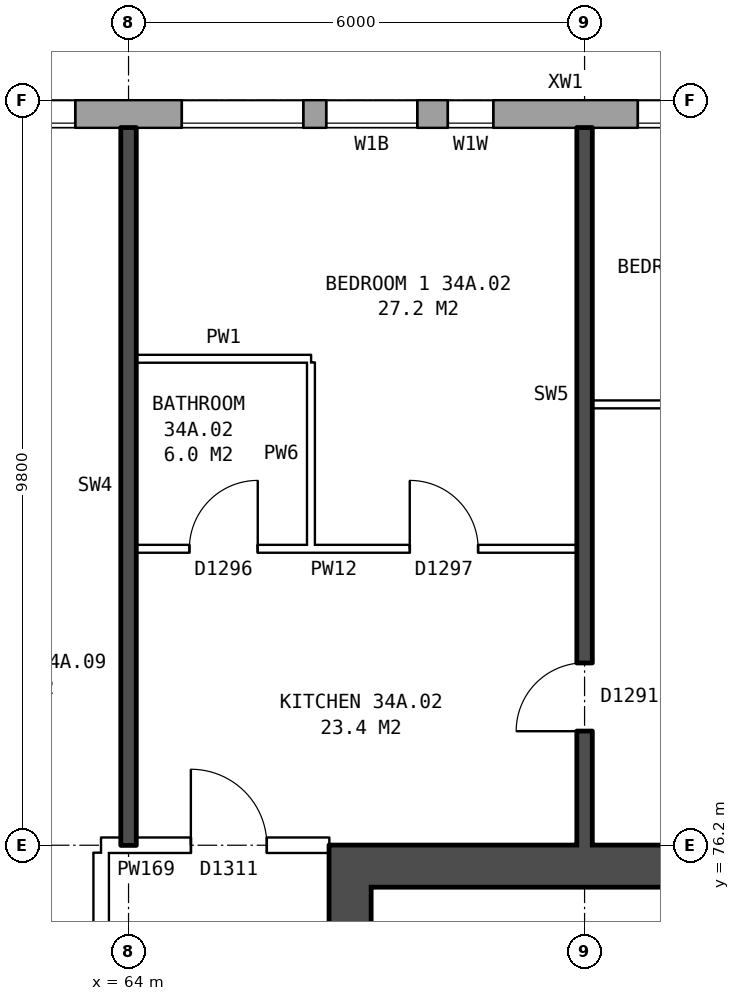
"""IFC4 building model, lengths in metres.
Left out: names, types, materials, properties, quantities, classifications, styles, units other than length and angle.
Written with IfcOpenShell. Run it as: python <this file> out.ifc"""

import sys

from ifc_helpers import new_model, si_unit, direction, frame, frame_2d, origin, place, context, subcontext, project, spatial, rectangle, extrude, element, fill, save


model = new_model("IFC4")
c1 = context("Model", 3, precision=1e-05, world=origin(), true_north=direction((0.0, 1.0)))
c2 = subcontext(c1, "Body", "Model", "MODEL_VIEW")
j1 = project(units=[si_unit("LENGTHUNIT", "METRE"), si_unit("PLANEANGLEUNIT", "RADIAN")], contexts=[c1])
p1 = place(None, origin())
s1 = spatial("IfcSite", under=j1, at=p1, CompositionType="ELEMENT")
p2 = place(p1, origin())
s2 = spatial("IfcBuilding", under=s1, at=p2, CompositionType="ELEMENT")
p3 = place(p2, frame((0.0, 0.0, 123.7)))
s3 = spatial("IfcBuildingStorey", under=s2, at=p3, CompositionType="ELEMENT", Elevation=123.7)
p4 = place(p3, frame((72.925, 85.82, 0.0), z_axis=(0.0, 0.0, 1.0), x_axis=(-1.0, 0.0, 0.0)))
e1 = element("IfcWall", 1, at=p4, inside=s3, PredefinedType="STANDARD", context=c2, shape_type="SweptSolid", body=[
    extrude(rectangle(XDim=43.101, YDim=0.36, at=frame_2d((21.55, 0.0))), origin(), (0.0, 0.0, 1.0), 2.85),
])
p5 = place(p4, frame((0.625, 0.0, 0.8)))
e2 = element("IfcOpeningElement", 2, at=p5, cuts=e1, PredefinedType="OPENING", context=c2, shape_type="SweptSolid", body=[
    extrude(rectangle(XDim=1.6, YDim=1.8, at=frame_2d((0.8, 0.9))), frame((0.0, 0.19, 0.0), z_axis=(0.0, -1.0, 0.0), x_axis=(1.0, 0.0, 0.0)), (0.0, 0.0, 1.0), 0.38),
])
p6 = place(p4, frame((4.125, 0.0, 0.8)))
e3 = element("IfcOpeningElement", 3, at=p6, cuts=e1, PredefinedType="OPENING", context=c2, shape_type="SweptSolid", body=[
    extrude(rectangle(XDim=0.6, YDim=0.9, at=frame_2d((0.3, 0.45))), frame((0.0, 0.19, 0.0), z_axis=(0.0, -1.0, 0.0), x_axis=(1.0, 0.0, 0.0)), (0.0, 0.0, 1.0), 0.38),
])
p7 = place(p4, frame((6.625, 0.0, 0.8)))
e4 = element("IfcOpeningElement", 4, at=p7, cuts=e1, PredefinedType="OPENING", context=c2, shape_type="SweptSolid", body=[
    extrude(rectangle(XDim=1.6, YDim=1.8, at=frame_2d((0.8, 0.9))), frame((0.0, 0.19, 0.0), z_axis=(0.0, -1.0, 0.0), x_axis=(1.0, 0.0, 0.0)), (0.0, 0.0, 1.0), 0.38),
])
p8 = place(p4, frame((9.625, 0.0, 0.8)))
e5 = element("IfcOpeningElement", 5, at=p8, cuts=e1, PredefinedType="OPENING", context=c2, shape_type="SweptSolid", body=[
    extrude(rectangle(XDim=1.6, YDim=1.8, at=frame_2d((0.8, 0.9))), frame((0.0, 0.19, 0.0), z_axis=(0.0, -1.0, 0.0), x_axis=(1.0, 0.0, 0.0)), (0.0, 0.0, 1.0), 0.38),
])
p9 = place(p4, frame((12.625, 0.0, 0.8)))
e6 = element("IfcOpeningElement", 6, at=p9, cuts=e1, PredefinedType="OPENING", context=c2, shape_type="SweptSolid", body=[
    extrude(rectangle(XDim=1.6, YDim=1.8, at=frame_2d((0.8, 0.9))), frame((0.0, 0.19, 0.0), z_axis=(0.0, -1.0, 0.0), x_axis=(1.0, 0.0, 0.0)), (0.0, 0.0, 1.0), 0.38),
])
p10 = place(p4, frame((15.625, 0.0, 0.8)))
e7 = element("IfcOpeningElement", 7, at=p10, cuts=e1, PredefinedType="OPENING", context=c2, shape_type="SweptSolid", body=[
    extrude(rectangle(XDim=1.6, YDim=1.8, at=frame_2d((0.8, 0.9))), frame((0.0, 0.19, 0.0), z_axis=(0.0, -1.0, 0.0), x_axis=(1.0, 0.0, 0.0)), (0.0, 0.0, 1.0), 0.38),
])
p11 = place(p4, frame((18.625, 0.0, 0.8)))
e8 = element("IfcOpeningElement", 8, at=p11, cuts=e1, PredefinedType="OPENING", context=c2, shape_type="SweptSolid", body=[
    extrude(rectangle(XDim=1.6, YDim=1.8, at=frame_2d((0.8, 0.9))), frame((0.0, 0.19, 0.0), z_axis=(0.0, -1.0, 0.0), x_axis=(1.0, 0.0, 0.0)), (0.0, 0.0, 1.0), 0.38),
])
p12 = place(p4, frame((21.625, 0.0, 0.8)))
e9 = element("IfcOpeningElement", 9, at=p12, cuts=e1, PredefinedType="OPENING", context=c2, shape_type="SweptSolid", body=[
    extrude(rectangle(XDim=1.6, YDim=1.8, at=frame_2d((0.8, 0.9))), frame((0.0, 0.19, 0.0), z_axis=(0.0, -1.0, 0.0), x_axis=(1.0, 0.0, 0.0)), (0.0, 0.0, 1.0), 0.38),
])
p13 = place(p4, frame((24.625, 0.0, 0.8)))
e10 = element("IfcOpeningElement", 10, at=p13, cuts=e1, PredefinedType="OPENING", context=c2, shape_type="SweptSolid", body=[
    extrude(rectangle(XDim=1.6, YDim=1.8, at=frame_2d((0.8, 0.9))), frame((0.0, 0.19, 0.0), z_axis=(0.0, -1.0, 0.0), x_axis=(1.0, 0.0, 0.0)), (0.0, 0.0, 1.0), 0.38),
])
p14 = place(p4, frame((27.625, 0.0, 0.8)))
e11 = element("IfcOpeningElement", 11, at=p14, cuts=e1, PredefinedType="OPENING", context=c2, shape_type="SweptSolid", body=[
    extrude(rectangle(XDim=1.6, YDim=1.8, at=frame_2d((0.8, 0.9))), frame((0.0, 0.19, 0.0), z_axis=(0.0, -1.0, 0.0), x_axis=(1.0, 0.0, 0.0)), (0.0, 0.0, 1.0), 0.38),
])
p15 = place(p4, frame((30.625, 0.0, 0.8)))
e12 = element("IfcOpeningElement", 12, at=p15, cuts=e1, PredefinedType="OPENING", context=c2, shape_type="SweptSolid", body=[
    extrude(rectangle(XDim=1.6, YDim=1.8, at=frame_2d((0.8, 0.9))), frame((0.0, 0.19, 0.0), z_axis=(0.0, -1.0, 0.0), x_axis=(1.0, 0.0, 0.0)), (0.0, 0.0, 1.0), 0.38),
])
p16 = place(p4, frame((33.625, 0.0, 0.8)))
e13 = element("IfcOpeningElement", 13, at=p16, cuts=e1, PredefinedType="OPENING", context=c2, shape_type="SweptSolid", body=[
    extrude(rectangle(XDim=1.6, YDim=1.8, at=frame_2d((0.8, 0.9))), frame((0.0, 0.19, 0.0), z_axis=(0.0, -1.0, 0.0), x_axis=(1.0, 0.0, 0.0)), (0.0, 0.0, 1.0), 0.38),
])
p17 = place(p4, frame((36.625, 0.0, 0.8)))
e14 = element("IfcOpeningElement", 14, at=p17, cuts=e1, PredefinedType="OPENING", context=c2, shape_type="SweptSolid", body=[
    extrude(rectangle(XDim=1.6, YDim=1.8, at=frame_2d((0.8, 0.9))), frame((0.0, 0.19, 0.0), z_axis=(0.0, -1.0, 0.0), x_axis=(1.0, 0.0, 0.0)), (0.0, 0.0, 1.0), 0.38),
])
p18 = place(p4, frame((40.125, 0.0, 1.7)))
e15 = element("IfcOpeningElement", 15, at=p18, cuts=e1, PredefinedType="OPENING", context=c2, shape_type="SweptSolid", body=[
    extrude(rectangle(XDim=0.6, YDim=0.9, at=frame_2d((0.3, 0.45))), frame((0.0, 0.19, 0.0), z_axis=(0.0, -1.0, 0.0), x_axis=(1.0, 0.0, 0.0)), (0.0, 0.0, 1.0), 0.38),
])
p19 = place(p4, frame((5.125, 0.0, 0.8)))
e16 = element("IfcOpeningElement", 16, at=p19, cuts=e1, PredefinedType="OPENING", context=c2, shape_type="SweptSolid", body=[
    extrude(rectangle(XDim=1.2, YDim=1.8, at=frame_2d((0.6, 0.9))), frame((0.0, 0.19, 0.0), z_axis=(0.0, -1.0, 0.0), x_axis=(1.0, 0.0, 0.0)), (0.0, 0.0, 1.0), 0.38),
])
p20 = place(p4, frame((41.125, 0.0, 0.8)))
e17 = element("IfcOpeningElement", 17, at=p20, cuts=e1, PredefinedType="OPENING", context=c2, shape_type="SweptSolid", body=[
    extrude(rectangle(XDim=1.6, YDim=1.8, at=frame_2d((0.8, 0.9))), frame((0.0, 0.19, 0.0), z_axis=(0.0, -1.0, 0.0), x_axis=(1.0, 0.0, 0.0)), (0.0, 0.0, 1.0), 0.38),
])
p21 = place(p3, frame((66.915, 63.8, 0.0), z_axis=(0.0, 0.0, 1.0), x_axis=(0.0, 1.0, 0.0)))
e18 = element("IfcWall", 18, at=p21, inside=s3, PredefinedType="SHEAR", context=c2, shape_type="SweptSolid", body=[
    extrude(rectangle(XDim=12.4, YDim=0.55, at=frame_2d((6.2, 0.0))), origin(), (0.0, 0.0, 1.0), 2.85),
])
p22 = place(p21, frame((1.325, 0.0, 0.0)))
e19 = element("IfcOpeningElement", 19, at=p22, cuts=e18, PredefinedType="OPENING", context=c2, shape_type="SweptSolid", body=[
    extrude(rectangle(XDim=1.1, YDim=2.1, at=frame_2d((0.55, 1.05))), frame((0.0, 0.285, 0.0), z_axis=(0.0, -1.0, 0.0), x_axis=(1.0, 0.0, 0.0)), (0.0, 0.0, 1.0), 0.57),
])
p23 = place(p21, frame((3.6, 0.0, 0.0)))
e20 = element("IfcOpeningElement", 20, at=p23, cuts=e18, PredefinedType="OPENING", context=c2, shape_type="SweptSolid", body=[
    extrude(rectangle(XDim=1.1, YDim=2.1, at=frame_2d((0.55, 1.05))), frame((0.0, 0.285, 0.0), z_axis=(0.0, -1.0, 0.0), x_axis=(1.0, 0.0, 0.0)), (0.0, 0.0, 1.0), 0.57),
])
p24 = place(p21, frame((5.8, 0.0, 0.0)))
e21 = element("IfcOpeningElement", 21, at=p24, cuts=e18, PredefinedType="OPENING", context=c2, shape_type="SweptSolid", body=[
    extrude(rectangle(XDim=1.1, YDim=2.1, at=frame_2d((0.55, 1.05))), frame((0.0, 0.285, 0.0), z_axis=(0.0, -1.0, 0.0), x_axis=(1.0, 0.0, 0.0)), (0.0, 0.0, 1.0), 0.57),
])
p25 = place(p21, frame((8.0, 0.0, 0.0)))
e22 = element("IfcOpeningElement", 22, at=p25, cuts=e18, PredefinedType="OPENING", context=c2, shape_type="SweptSolid", body=[
    extrude(rectangle(XDim=1.1, YDim=2.1, at=frame_2d((0.55, 1.05))), frame((0.0, 0.285, 0.0), z_axis=(0.0, -1.0, 0.0), x_axis=(1.0, 0.0, 0.0)), (0.0, 0.0, 1.0), 0.57),
])
p26 = place(p21, frame((9.9, 0.0, 0.0)))
e23 = element("IfcOpeningElement", 23, at=p26, cuts=e18, PredefinedType="OPENING", context=c2, shape_type="SweptSolid", body=[
    extrude(rectangle(XDim=1.1, YDim=2.1, at=frame_2d((0.55, 1.05))), frame((0.0, 0.285, 0.0), z_axis=(0.0, -1.0, 0.0), x_axis=(1.0, 0.0, 0.0)), (0.0, 0.0, 1.0), 0.57),
])
p27 = place(p3, frame((67.19, 75.925, 0.0), z_axis=(0.0, 0.0, 1.0), x_axis=(1.0, 0.0, 0.0)))
e24 = element("IfcWall", 24, at=p27, inside=s3, PredefinedType="SHEAR", context=c2, shape_type="SweptSolid", body=[
    extrude(rectangle(XDim=7.9, YDim=0.55, at=frame_2d((3.95, 0.0))), origin(), (0.0, 0.0, 1.0), 2.85),
])
p28 = place(p3, frame((63.64, 63.9, 0.0), z_axis=(0.0, 0.0, 1.0), x_axis=(0.0, 1.0, 0.0)))
e25 = element("IfcWall", 25, at=p28, inside=s3, PredefinedType="PARTITIONING", context=c2, shape_type="SweptSolid", body=[
    extrude(rectangle(XDim=12.2, YDim=0.2, at=frame_2d((6.1, 0.0))), origin(), (0.0, 0.0, 1.0), 2.85),
])
p29 = place(p28, frame((5.1, 0.0, 0.0)))
e26 = element("IfcOpeningElement", 26, at=p29, cuts=e25, PredefinedType="OPENING", context=c2, shape_type="SweptSolid", body=[
    extrude(rectangle(XDim=2.0, YDim=2.1, at=frame_2d((1.0, 1.05))), frame((0.0, 0.11, 0.0), z_axis=(0.0, -1.0, 0.0), x_axis=(1.0, 0.0, 0.0)), (0.0, 0.0, 1.0), 0.22),
])
p30 = place(p3, frame((63.64, 76.2, 0.0), z_axis=(0.0, 0.0, 1.0), x_axis=(1.0, 0.0, 0.0)))
e27 = element("IfcWall", 27, at=p30, inside=s3, PredefinedType="PARTITIONING", context=c2, shape_type="SweptSolid", body=[
    extrude(rectangle(XDim=3.0, YDim=0.2, at=frame_2d((1.5, 0.0))), origin(), (0.0, 0.0, 1.0), 2.85),
])
p31 = place(p30, frame((1.18, 0.0, 0.0)))
e28 = element("IfcOpeningElement", 28, at=p31, cuts=e27, PredefinedType="OPENING", context=c2, shape_type="SweptSolid", body=[
    extrude(rectangle(XDim=1.0, YDim=2.1, at=frame_2d((0.5, 1.05))), frame((0.0, 0.11, 0.0), z_axis=(0.0, -1.0, 0.0), x_axis=(1.0, 0.0, 0.0)), (0.0, 0.0, 1.0), 0.22),
])
p32 = place(p3, frame((64.1, 80.1, 0.0), z_axis=(0.0, 0.0, 1.0), x_axis=(1.0, 0.0, 0.0)))
e29 = element("IfcWall", 29, at=p32, inside=s3, PredefinedType="PARTITIONING", context=c2, shape_type="SweptSolid", body=[
    extrude(rectangle(XDim=5.8, YDim=0.1, at=frame_2d((2.9, 0.0))), origin(), (0.0, 0.0, 1.0), 2.85),
])
p33 = place(p32, frame((3.6, 0.0, 0.0)))
e30 = element("IfcOpeningElement", 30, at=p33, cuts=e29, PredefinedType="OPENING", context=c2, shape_type="SweptSolid", body=[
    extrude(rectangle(XDim=0.9, YDim=2.1, at=frame_2d((0.45, 1.05))), frame((0.0, 0.06, 0.0), z_axis=(0.0, -1.0, 0.0), x_axis=(1.0, 0.0, 0.0)), (0.0, 0.0, 1.0), 0.12),
])
p34 = place(p32, frame((0.7, 0.0, 0.0)))
e31 = element("IfcOpeningElement", 31, at=p34, cuts=e29, PredefinedType="OPENING", context=c2, shape_type="SweptSolid", body=[
    extrude(rectangle(XDim=0.9, YDim=2.1, at=frame_2d((0.45, 1.05))), frame((0.0, 0.06, 0.0), z_axis=(0.0, -1.0, 0.0), x_axis=(1.0, 0.0, 0.0)), (0.0, 0.0, 1.0), 0.12),
])
p35 = place(p3, frame((70.1, 82.0, 0.0), z_axis=(0.0, 0.0, 1.0), x_axis=(1.0, 0.0, 0.0)))
e32 = element("IfcWall", 32, at=p35, inside=s3, PredefinedType="PARTITIONING", context=c2, shape_type="SweptSolid", body=[
    extrude(rectangle(XDim=5.54, YDim=0.1, at=frame_2d((2.77, 0.0))), origin(), (0.0, 0.0, 1.0), 2.85),
])
p36 = place(p35, frame((2.32, 0.0, 0.0)))
e33 = element("IfcOpeningElement", 33, at=p36, cuts=e32, PredefinedType="OPENING", context=c2, shape_type="SweptSolid", body=[
    extrude(rectangle(XDim=0.9, YDim=2.1, at=frame_2d((0.45, 1.05))), frame((0.0, 0.06, 0.0), z_axis=(0.0, -1.0, 0.0), x_axis=(1.0, 0.0, 0.0)), (0.0, 0.0, 1.0), 0.12),
])
p37 = place(p3, frame((64.1, 82.6, 0.0), z_axis=(0.0, 0.0, 1.0), x_axis=(1.0, 0.0, 0.0)))
e34 = element("IfcWall", 34, at=p37, inside=s3, PredefinedType="PARTITIONING", context=c2, shape_type="SweptSolid", body=[
    extrude(rectangle(XDim=2.3, YDim=0.1, at=frame_2d((1.15, 0.0))), origin(), (0.0, 0.0, 1.0), 2.85),
])
p38 = place(p3, frame((64.0, 76.2, 0.0), z_axis=(0.0, 0.0, 1.0), x_axis=(0.0, 1.0, 0.0)))
e35 = element("IfcWall", 35, at=p38, inside=s3, PredefinedType="SOLIDWALL", context=c2, shape_type="SweptSolid", body=[
    extrude(rectangle(XDim=9.44, YDim=0.2, at=frame_2d((4.72, 0.0))), origin(), (0.0, 0.0, 1.0), 2.85),
])
p39 = place(p3, frame((66.4, 80.15, 0.0), z_axis=(0.0, 0.0, 1.0), x_axis=(0.0, 1.0, 0.0)))
e36 = element("IfcWall", 36, at=p39, inside=s3, PredefinedType="PARTITIONING", context=c2, shape_type="SweptSolid", body=[
    extrude(rectangle(XDim=2.4, YDim=0.1, at=frame_2d((1.2, 0.0))), origin(), (0.0, 0.0, 1.0), 2.85),
])
p40 = place(p3, frame((70.0, 76.2, 0.0), z_axis=(0.0, 0.0, 1.0), x_axis=(0.0, 1.0, 0.0)))
e37 = element("IfcWall", 37, at=p40, inside=s3, PredefinedType="SOLIDWALL", context=c2, shape_type="SweptSolid", body=[
    extrude(rectangle(XDim=9.44, YDim=0.2, at=frame_2d((4.72, 0.0))), origin(), (0.0, 0.0, 1.0), 2.85),
])
p41 = place(p40, frame((1.5, 0.0, 0.0)))
e38 = element("IfcOpeningElement", 38, at=p41, cuts=e37, PredefinedType="OPENING", context=c2, shape_type="SweptSolid", body=[
    extrude(rectangle(XDim=0.9, YDim=2.1, at=frame_2d((0.45, 1.05))), frame((0.0, 0.11, 0.0), z_axis=(0.0, -1.0, 0.0), x_axis=(1.0, 0.0, 0.0)), (0.0, 0.0, 1.0), 0.22),
])
p42 = place(p5, origin())
e39 = element("IfcWindow", 39, at=p42, inside=s3, PartitioningType="SINGLE_PANEL", PredefinedType="WINDOW", context=c2, shape_type="SweptSolid", body=[
    extrude(rectangle(XDim=1.6, YDim=1.8, at=frame_2d((0.8, 0.9))), frame((0.0, 0.15, 0.0), z_axis=(0.0, -1.0, 0.0), x_axis=(1.0, 0.0, 0.0)), (0.0, 0.0, 1.0), 0.06),
])
fill(e2, e39)
p43 = place(p6, origin())
e40 = element("IfcWindow", 40, at=p43, inside=s3, PartitioningType="SINGLE_PANEL", PredefinedType="WINDOW", context=c2, shape_type="SweptSolid", body=[
    extrude(rectangle(XDim=0.6, YDim=0.9, at=frame_2d((0.3, 0.45))), frame((0.0, 0.15, 0.0), z_axis=(0.0, -1.0, 0.0), x_axis=(1.0, 0.0, 0.0)), (0.0, 0.0, 1.0), 0.06),
])
fill(e3, e40)
p44 = place(p7, origin())
e41 = element("IfcWindow", 41, at=p44, inside=s3, PartitioningType="SINGLE_PANEL", PredefinedType="WINDOW", context=c2, shape_type="SweptSolid", body=[
    extrude(rectangle(XDim=1.6, YDim=1.8, at=frame_2d((0.8, 0.9))), frame((0.0, 0.15, 0.0), z_axis=(0.0, -1.0, 0.0), x_axis=(1.0, 0.0, 0.0)), (0.0, 0.0, 1.0), 0.06),
])
fill(e4, e41)
p45 = place(p8, origin())
e42 = element("IfcWindow", 42, at=p45, inside=s3, PartitioningType="SINGLE_PANEL", PredefinedType="WINDOW", context=c2, shape_type="SweptSolid", body=[
    extrude(rectangle(XDim=1.6, YDim=1.8, at=frame_2d((0.8, 0.9))), frame((0.0, 0.15, 0.0), z_axis=(0.0, -1.0, 0.0), x_axis=(1.0, 0.0, 0.0)), (0.0, 0.0, 1.0), 0.06),
])
fill(e5, e42)
p46 = place(p33, origin())
e43 = element("IfcDoor", 43, at=p46, inside=s3, OperationType="SINGLE_SWING_LEFT", PredefinedType="DOOR", context=c2, shape_type="SweptSolid", body=[
    extrude(rectangle(XDim=0.9, YDim=2.1, at=frame_2d((0.45, 1.05))), frame((0.0, 0.025, 0.0), z_axis=(0.0, -1.0, 0.0), x_axis=(1.0, 0.0, 0.0)), (0.0, 0.0, 1.0), 0.05),
])
fill(e30, e43)
p47 = place(p31, origin())
e44 = element("IfcDoor", 44, at=p47, inside=s3, OperationType="SINGLE_SWING_LEFT", PredefinedType="DOOR", context=c2, shape_type="SweptSolid", body=[
    extrude(rectangle(XDim=1.0, YDim=2.1, at=frame_2d((0.5, 1.05))), frame((0.0, 0.025, 0.0), z_axis=(0.0, -1.0, 0.0), x_axis=(1.0, 0.0, 0.0)), (0.0, 0.0, 1.0), 0.05),
])
fill(e28, e44)
p48 = place(p41, origin())
e45 = element("IfcDoor", 45, at=p48, inside=s3, OperationType="SINGLE_SWING_LEFT", PredefinedType="DOOR", context=c2, shape_type="SweptSolid", body=[
    extrude(rectangle(XDim=0.9, YDim=2.1, at=frame_2d((0.45, 1.05))), frame((0.0, 0.025, 0.0), z_axis=(0.0, -1.0, 0.0), x_axis=(1.0, 0.0, 0.0)), (0.0, 0.0, 1.0), 0.05),
])
fill(e38, e45)
p49 = place(p34, origin())
e46 = element("IfcDoor", 46, at=p49, inside=s3, OperationType="SINGLE_SWING_RIGHT", PredefinedType="DOOR", context=c2, shape_type="SweptSolid", body=[
    extrude(rectangle(XDim=0.9, YDim=2.1, at=frame_2d((0.45, 1.05))), frame((0.0, 0.025, 0.0), z_axis=(0.0, -1.0, 0.0), x_axis=(1.0, 0.0, 0.0)), (0.0, 0.0, 1.0), 0.05),
])
fill(e31, e46)
p50 = place(p19, origin())
e47 = element("IfcWindow", 47, at=p50, inside=s3, PartitioningType="SINGLE_PANEL", PredefinedType="WINDOW", context=c2, shape_type="SweptSolid", body=[
    extrude(rectangle(XDim=1.2, YDim=1.8, at=frame_2d((0.6, 0.9))), frame((0.0, 0.15, 0.0), z_axis=(0.0, -1.0, 0.0), x_axis=(1.0, 0.0, 0.0)), (0.0, 0.0, 1.0), 0.06),
])
fill(e16, e47)
save(model, sys.argv[1])
